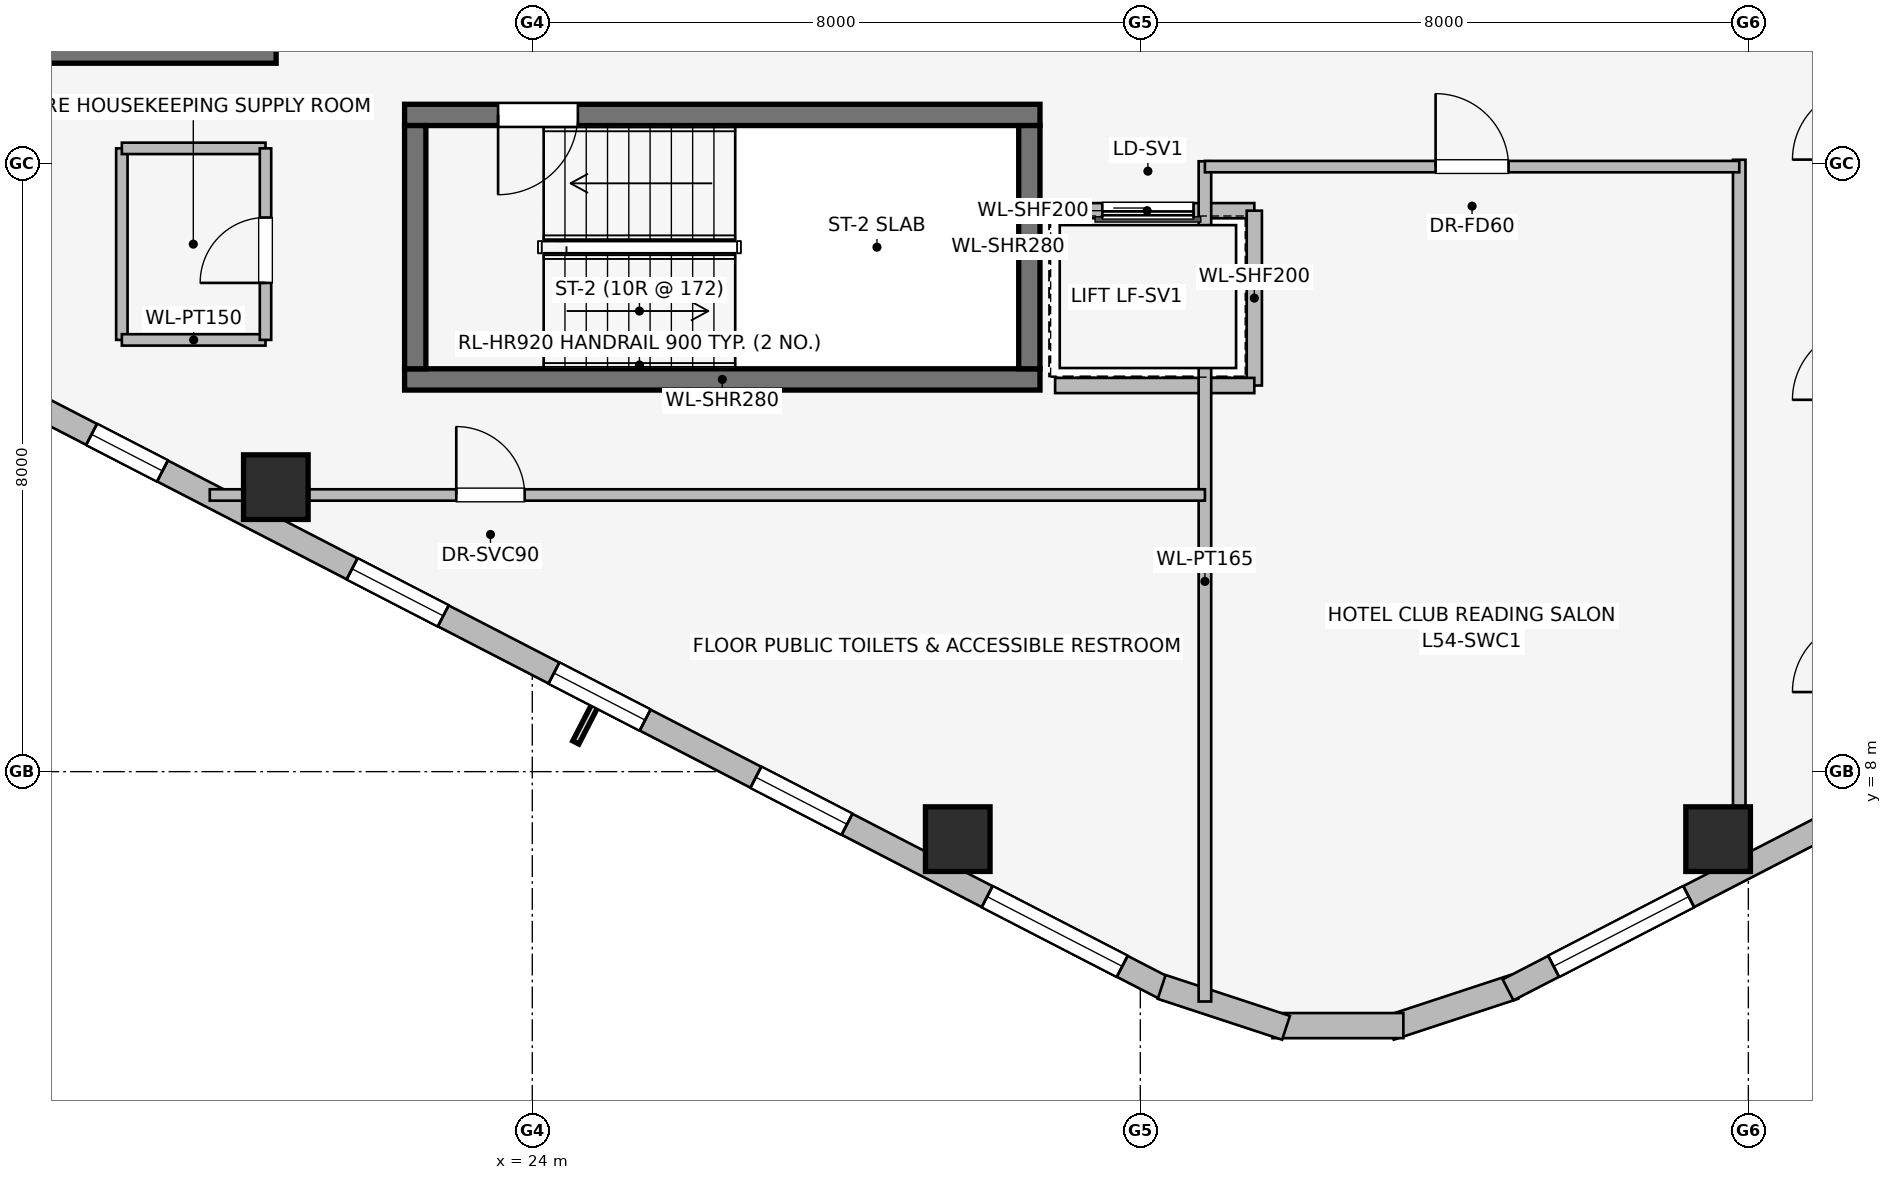
"""IFC4 building model, lengths in metres.
Left out: names, types, materials, properties, quantities, classifications, styles, units other than length and angle.
Written with IfcOpenShell. Run it as: python <this file> out.ifc"""

import sys

from ifc_helpers import new_model, si_unit, direction, frame, frame_2d, origin, origin_2d, place, context, subcontext, project, spatial, rectangle, extrude, element, fill, save


model = new_model("IFC4")
c1 = context("Model", 3, precision=1e-05, world=origin(), true_north=direction((0.0, 1.0)))
c2 = subcontext(c1, "Body", "Model", "MODEL_VIEW")
j1 = project(units=[si_unit("LENGTHUNIT", "METRE"), si_unit("PLANEANGLEUNIT", "RADIAN")], contexts=[c1])
p1 = place(None, origin())
s1 = spatial("IfcSite", under=j1, at=p1, CompositionType="ELEMENT")
p2 = place(p1, origin())
s2 = spatial("IfcBuilding", under=s1, at=p2, CompositionType="ELEMENT")
p3 = place(p2, frame((0.0, 0.0, 199.9)))
s3 = spatial("IfcBuildingStorey", under=s2, at=p3, CompositionType="ELEMENT", Elevation=199.9)
p4 = place(p3, frame((16.87, 17.46, 0.0), z_axis=(0.0, 0.0, 1.0), x_axis=(1.0, 0.0, 0.0)))
e1 = element("IfcWall", 1, at=p4, inside=s3, PredefinedType="SHEAR", context=c2, shape_type="SweptSolid", body=[
    extrude(rectangle(XDim=3.76, YDim=0.28, at=frame_2d((1.88, 0.0))), origin(), (0.0, 0.0, 1.0), 3.45),
])
p5 = place(p3, frame((22.32, 13.16, 0.0), z_axis=(0.0, 0.0, 1.0), x_axis=(1.0, 0.0, 0.0)))
e2 = element("IfcWall", 2, at=p5, inside=s3, PredefinedType="SHEAR", context=c2, shape_type="SweptSolid", body=[
    extrude(rectangle(XDim=8.36, YDim=0.28, at=frame_2d((4.18, 0.0))), origin(), (0.0, 0.0, 1.0), 3.45),
])
p6 = place(p3, frame((30.68, 16.64, 0.0), z_axis=(0.0, 0.0, 1.0), x_axis=(-1.0, 0.0, 0.0)))
e3 = element("IfcWall", 3, at=p6, inside=s3, PredefinedType="SHEAR", context=c2, shape_type="SweptSolid", body=[
    extrude(rectangle(XDim=8.36, YDim=0.28, at=frame_2d((4.18, 0.0))), origin(), (0.0, 0.0, 1.0), 3.45),
])
p7 = place(p6, frame((6.08, 0.0, 0.0)))
e4 = element("IfcOpeningElement", 4, at=p7, cuts=e3, PredefinedType="OPENING", context=c2, shape_type="SweptSolid", body=[
    extrude(rectangle(XDim=1.05, YDim=2.0, at=frame_2d((0.525, 1.0))), frame((0.0, 0.15, 0.0), z_axis=(0.0, -1.0, 0.0), x_axis=(1.0, 0.0, 0.0)), (0.0, 0.0, 1.0), 0.3),
])
for number, where, z_axis, x_axis in (
    (5, (22.46, 16.5, 0.0), (0.0, 0.0, 1.0), (0.0, -1.0, 0.0)),
    (6, (30.54, 13.3, 0.0), (0.0, 0.0, 1.0), (0.0, 1.0, 0.0)),
):
    element("IfcWall", number, at=place(p3, frame(where, z_axis=z_axis, x_axis=x_axis)), inside=s3, PredefinedType="SHEAR", context=c2, shape_type="SweptSolid", body=[
        extrude(rectangle(XDim=3.2, YDim=0.28, at=frame_2d((1.6, 0.0))), origin(), (0.0, 0.0, 1.0), 3.45),
    ])
for number, where, z_axis, x_axis in (
    (7, (20.626, 11.743, 0.0), (0.0, 0.0, 1.0), (1.0, 0.0, 0.0)),
    (8, (29.598, 7.112, 0.0), (0.0, 0.0, 1.0), (1.0, 0.0, 0.0)),
    (9, (39.602, 7.112, 0.0), (0.0, 0.0, 1.0), (1.0, 0.0, 0.0)),
):
    element("IfcColumn", number, at=place(p3, frame(where, z_axis=z_axis, x_axis=x_axis)), inside=s3, PredefinedType="COLUMN", context=c2, shape_type="SweptSolid", body=[
        extrude(rectangle(XDim=0.85, YDim=0.85, at=origin_2d()), origin(), (0.0, 0.0, 1.0), 3.45),
    ])
p8 = place(p3, frame((32.362, 5.129, 0.0), z_axis=(0.0, 0.0, 1.0), x_axis=(-0.888626188278, 0.458632202867, 0.0)))
e10 = element("IfcWall", 10, at=p8, inside=s3, PredefinedType="STANDARD", context=c2, shape_type="SweptSolid", body=[
    extrude(rectangle(XDim=16.828, YDim=0.31, at=frame_2d((8.414, 0.0))), origin(), (0.0, 0.0, 1.0), 3.19),
])
p9 = place(p8, frame((0.675, 0.0, 0.75)))
e11 = element("IfcOpeningElement", 11, at=p9, cuts=e10, PredefinedType="OPENING", context=c2, shape_type="SweptSolid", body=[
    extrude(rectangle(XDim=2.0, YDim=1.5, at=frame_2d((1.0, 0.75))), frame((0.0, 0.165, 0.0), z_axis=(0.0, -1.0, 0.0), x_axis=(1.0, 0.0, 0.0)), (0.0, 0.0, 1.0), 0.33),
])
p10 = place(p8, frame((4.75, 0.0, 0.75)))
e12 = element("IfcOpeningElement", 12, at=p10, cuts=e10, PredefinedType="OPENING", context=c2, shape_type="SweptSolid", body=[
    extrude(rectangle(XDim=1.35, YDim=1.45, at=frame_2d((0.675, 0.725))), frame((0.0, 0.165, 0.0), z_axis=(0.0, -1.0, 0.0), x_axis=(1.0, 0.0, 0.0)), (0.0, 0.0, 1.0), 0.33),
])
p11 = place(p8, frame((7.739, 0.0, 0.75)))
e13 = element("IfcOpeningElement", 13, at=p11, cuts=e10, PredefinedType="OPENING", context=c2, shape_type="SweptSolid", body=[
    extrude(rectangle(XDim=1.35, YDim=1.45, at=frame_2d((0.675, 0.725))), frame((0.0, 0.165, 0.0), z_axis=(0.0, -1.0, 0.0), x_axis=(1.0, 0.0, 0.0)), (0.0, 0.0, 1.0), 0.33),
])
p12 = place(p8, frame((10.728, 0.0, 0.75)))
e14 = element("IfcOpeningElement", 14, at=p12, cuts=e10, PredefinedType="OPENING", context=c2, shape_type="SweptSolid", body=[
    extrude(rectangle(XDim=1.35, YDim=1.45, at=frame_2d((0.675, 0.725))), frame((0.0, 0.165, 0.0), z_axis=(0.0, -1.0, 0.0), x_axis=(1.0, 0.0, 0.0)), (0.0, 0.0, 1.0), 0.33),
])
p13 = place(p8, frame((14.885, 0.0, 0.75)))
e15 = element("IfcOpeningElement", 15, at=p13, cuts=e10, PredefinedType="OPENING", context=c2, shape_type="SweptSolid", body=[
    extrude(rectangle(XDim=1.05, YDim=1.4, at=frame_2d((0.525, 0.7))), frame((0.0, 0.165, 0.0), z_axis=(0.0, -1.0, 0.0), x_axis=(1.0, 0.0, 0.0)), (0.0, 0.0, 1.0), 0.33),
])
p14 = place(p3, frame((36.919, 5.168, 0.0), z_axis=(0.0, 0.0, 1.0), x_axis=(-0.949937416267, -0.312440242569, 0.0)))
e16 = element("IfcWall", 16, at=p14, inside=s3, PredefinedType="STANDARD", context=c2, shape_type="SweptSolid", body=[
    extrude(rectangle(XDim=1.722, YDim=0.33, at=frame_2d((0.861, 0.0))), origin(), (0.0, 0.0, 1.0), 3.19),
])
p15 = place(p3, frame((35.461, 4.659, 0.0), z_axis=(0.0, 0.0, 1.0), x_axis=(-1.0, 0.0, 0.0)))
e17 = element("IfcWall", 17, at=p15, inside=s3, PredefinedType="STANDARD", context=c2, shape_type="SweptSolid", body=[
    extrude(rectangle(XDim=1.722, YDim=0.33, at=frame_2d((0.861, 0.0))), origin(), (0.0, 0.0, 1.0), 3.19),
])
p16 = place(p3, frame((33.917, 4.63, 0.0), z_axis=(0.0, 0.0, 1.0), x_axis=(-0.949937416267, 0.312440242569, 0.0)))
e18 = element("IfcWall", 18, at=p16, inside=s3, PredefinedType="STANDARD", context=c2, shape_type="SweptSolid", body=[
    extrude(rectangle(XDim=1.722, YDim=0.33, at=frame_2d((0.861, 0.0))), origin(), (0.0, 0.0, 1.0), 3.19),
])
p17 = place(p3, frame((51.792, 12.847, 0.0), z_axis=(0.0, 0.0, 1.0), x_axis=(-0.888626188278, -0.458632202867, 0.0)))
e19 = element("IfcWall", 19, at=p17, inside=s3, PredefinedType="STANDARD", context=c2, shape_type="SweptSolid", body=[
    extrude(rectangle(XDim=16.828, YDim=0.31, at=frame_2d((8.414, 0.0))), origin(), (0.0, 0.0, 1.0), 3.19),
])
p18 = place(p17, frame((0.729, 0.0, 0.75)))
e20 = element("IfcOpeningElement", 20, at=p18, cuts=e19, PredefinedType="OPENING", context=c2, shape_type="SweptSolid", body=[
    extrude(rectangle(XDim=1.05, YDim=1.4, at=frame_2d((0.525, 0.7))), frame((0.0, 0.165, 0.0), z_axis=(0.0, -1.0, 0.0), x_axis=(1.0, 0.0, 0.0)), (0.0, 0.0, 1.0), 0.33),
])
p19 = place(p17, frame((4.486, 0.0, 0.75)))
e21 = element("IfcOpeningElement", 21, at=p19, cuts=e19, PredefinedType="OPENING", context=c2, shape_type="SweptSolid", body=[
    extrude(rectangle(XDim=1.35, YDim=1.45, at=frame_2d((0.675, 0.725))), frame((0.0, 0.165, 0.0), z_axis=(0.0, -1.0, 0.0), x_axis=(1.0, 0.0, 0.0)), (0.0, 0.0, 1.0), 0.33),
])
p20 = place(p17, frame((6.946, 0.0, 0.75)))
e22 = element("IfcOpeningElement", 22, at=p20, cuts=e19, PredefinedType="OPENING", context=c2, shape_type="SweptSolid", body=[
    extrude(rectangle(XDim=1.35, YDim=1.45, at=frame_2d((0.675, 0.725))), frame((0.0, 0.165, 0.0), z_axis=(0.0, -1.0, 0.0), x_axis=(1.0, 0.0, 0.0)), (0.0, 0.0, 1.0), 0.33),
])
p21 = place(p17, frame((9.406, 0.0, 0.75)))
e23 = element("IfcOpeningElement", 23, at=p21, cuts=e19, PredefinedType="OPENING", context=c2, shape_type="SweptSolid", body=[
    extrude(rectangle(XDim=1.35, YDim=1.45, at=frame_2d((0.675, 0.725))), frame((0.0, 0.165, 0.0), z_axis=(0.0, -1.0, 0.0), x_axis=(1.0, 0.0, 0.0)), (0.0, 0.0, 1.0), 0.33),
])
p22 = place(p17, frame((14.153, 0.0, 0.75)))
e24 = element("IfcOpeningElement", 24, at=p22, cuts=e19, PredefinedType="OPENING", context=c2, shape_type="SweptSolid", body=[
    extrude(rectangle(XDim=2.0, YDim=1.5, at=frame_2d((1.0, 0.75))), frame((0.0, 0.165, 0.0), z_axis=(0.0, -1.0, 0.0), x_axis=(1.0, 0.0, 0.0)), (0.0, 0.0, 1.0), 0.33),
])
p23 = place(p3, frame((33.5, 15.38, 0.0), z_axis=(0.0, 0.0, 1.0), x_axis=(-1.0, 0.0, 0.0)))
e25 = element("IfcWall", 25, at=p23, inside=s3, PredefinedType="PARTITIONING", context=c2, shape_type="SweptSolid", body=[
    extrude(rectangle(XDim=2.82, YDim=0.2, at=frame_2d((1.41, 0.0))), origin(), (0.0, 0.0, 1.0), 3.19),
])
p24 = place(p23, frame((0.8, 0.0, 0.0)))
e26 = element("IfcOpeningElement", 26, at=p24, cuts=e25, PredefinedType="OPENING", context=c2, shape_type="SweptSolid", body=[
    extrude(rectangle(XDim=1.2, YDim=2.2, at=frame_2d((0.6, 1.1))), frame((0.0, 0.11, 0.0), z_axis=(0.0, -1.0, 0.0), x_axis=(1.0, 0.0, 0.0)), (0.0, 0.0, 1.0), 0.22),
])
p25 = place(p3, frame((33.5, 13.08, 0.0), z_axis=(0.0, 0.0, 1.0), x_axis=(0.0, 1.0, 0.0)))
e27 = element("IfcWall", 27, at=p25, inside=s3, PredefinedType="PARTITIONING", context=c2, shape_type="SweptSolid", body=[
    extrude(rectangle(XDim=2.3, YDim=0.2, at=frame_2d((1.15, 0.0))), origin(), (0.0, 0.0, 1.0), 3.19),
])
p26 = place(p3, frame((30.879, 13.08, 0.0), z_axis=(0.0, 0.0, 1.0), x_axis=(1.0, 0.0, 0.0)))
e28 = element("IfcWall", 28, at=p26, inside=s3, PredefinedType="PARTITIONING", context=c2, shape_type="SweptSolid", body=[
    extrude(rectangle(XDim=2.621, YDim=0.2, at=frame_2d((1.311, 0.0))), origin(), (0.0, 0.0, 1.0), 3.19),
])
p27 = place(p3, frame((18.6, 16.2, 0.0), z_axis=(0.0, 0.0, 1.0), x_axis=(0.0, -1.0, 0.0)))
e29 = element("IfcWall", 29, at=p27, inside=s3, PredefinedType="PARTITIONING", context=c2, shape_type="SweptSolid", body=[
    extrude(rectangle(XDim=2.52, YDim=0.15, at=frame_2d((1.26, 0.0))), origin(), (0.0, 0.0, 1.0), 3.19),
])
for number, where, z_axis, x_axis in (
    (30, (18.6, 13.68, 0.0), (0.0, 0.0, 1.0), (1.0, 0.0, 0.0)),
    (31, (18.6, 16.2, 0.0), (0.0, 0.0, 1.0), (1.0, 0.0, 0.0)),
):
    element("IfcWall", number, at=place(p3, frame(where, z_axis=z_axis, x_axis=x_axis)), inside=s3, PredefinedType="PARTITIONING", context=c2, shape_type="SweptSolid", body=[
        extrude(rectangle(XDim=1.89, YDim=0.15, at=frame_2d((0.945, 0.0))), origin(), (0.0, 0.0, 1.0), 3.19),
    ])
p28 = place(p3, frame((20.49, 13.68, 0.0), z_axis=(0.0, 0.0, 1.0), x_axis=(0.0, 1.0, 0.0)))
e32 = element("IfcWall", 32, at=p28, inside=s3, PredefinedType="PARTITIONING", context=c2, shape_type="SweptSolid", body=[
    extrude(rectangle(XDim=2.52, YDim=0.15, at=frame_2d((1.26, 0.0))), origin(), (0.0, 0.0, 1.0), 3.19),
])
p29 = place(p28, frame((0.75, 0.0, 0.0)))
e33 = element("IfcOpeningElement", 33, at=p29, cuts=e32, PredefinedType="OPENING", context=c2, shape_type="SweptSolid", body=[
    extrude(rectangle(XDim=0.86, YDim=2.0, at=frame_2d((0.43, 1.0))), frame((0.0, 0.085, 0.0), z_axis=(0.0, -1.0, 0.0), x_axis=(1.0, 0.0, 0.0)), (0.0, 0.0, 1.0), 0.17),
])
p30 = place(p3, frame((32.85, 4.976, 0.0), z_axis=(0.0, 0.0, 1.0), x_axis=(0.0, 1.0, 0.0)))
e34 = element("IfcWall", 34, at=p30, inside=s3, PredefinedType="PARTITIONING", context=c2, shape_type="SweptSolid", body=[
    extrude(rectangle(XDim=11.054, YDim=0.165, at=frame_2d((5.527, 0.0))), origin(), (0.0, 0.0, 1.0), 3.19),
])
p31 = place(p3, frame((19.757, 11.64, 0.0), z_axis=(0.0, 0.0, 1.0), x_axis=(1.0, 0.0, 0.0)))
e35 = element("IfcWall", 35, at=p31, inside=s3, PredefinedType="PARTITIONING", context=c2, shape_type="SweptSolid", body=[
    extrude(rectangle(XDim=13.093, YDim=0.15, at=frame_2d((6.546, 0.0))), origin(), (0.0, 0.0, 1.0), 3.19),
])
p32 = place(p31, frame((3.243, 0.0, 0.0)))
e36 = element("IfcOpeningElement", 36, at=p32, cuts=e35, PredefinedType="OPENING", context=c2, shape_type="SweptSolid", body=[
    extrude(rectangle(XDim=0.9, YDim=2.0, at=frame_2d((0.45, 1.0))), frame((0.0, 0.085, 0.0), z_axis=(0.0, -1.0, 0.0), x_axis=(1.0, 0.0, 0.0)), (0.0, 0.0, 1.0), 0.17),
])
p33 = place(p3, frame((39.88, 6.704, 0.0), z_axis=(0.0, 0.0, 1.0), x_axis=(0.0, 1.0, 0.0)))
e37 = element("IfcWall", 37, at=p33, inside=s3, PredefinedType="PARTITIONING", context=c2, shape_type="SweptSolid", body=[
    extrude(rectangle(XDim=9.346, YDim=0.165, at=frame_2d((4.673, 0.0))), origin(), (0.0, 0.0, 1.0), 2.497),
])
p34 = place(p3, frame((32.85, 15.96, 0.0), z_axis=(0.0, 0.0, 1.0), x_axis=(1.0, 0.0, 0.0)))
e38 = element("IfcWall", 38, at=p34, inside=s3, PredefinedType="PARTITIONING", context=c2, shape_type="SweptSolid", body=[
    extrude(rectangle(XDim=7.03, YDim=0.15, at=frame_2d((3.515, 0.0))), origin(), (0.0, 0.0, 1.0), 3.19),
])
p35 = place(p34, frame((3.035, 0.0, 0.0)))
e39 = element("IfcOpeningElement", 39, at=p35, cuts=e38, PredefinedType="OPENING", context=c2, shape_type="SweptSolid", body=[
    extrude(rectangle(XDim=0.96, YDim=2.0, at=frame_2d((0.48, 1.0))), frame((0.0, 0.085, 0.0), z_axis=(0.0, -1.0, 0.0), x_axis=(1.0, 0.0, 0.0)), (0.0, 0.0, 1.0), 0.17),
])
p36 = place(p9, origin())
e40 = element("IfcWindow", 40, at=p36, inside=s3, PartitioningType="SINGLE_PANEL", PredefinedType="WINDOW", context=c2, shape_type="SweptSolid", body=[
    extrude(rectangle(XDim=2.0, YDim=1.5, at=frame_2d((1.0, 0.75))), frame((0.0, 0.03, 0.0), z_axis=(0.0, -1.0, 0.0), x_axis=(1.0, 0.0, 0.0)), (0.0, 0.0, 1.0), 0.06),
])
fill(e11, e40)
p37 = place(p10, origin())
e41 = element("IfcWindow", 41, at=p37, inside=s3, PartitioningType="SINGLE_PANEL", PredefinedType="WINDOW", context=c2, shape_type="SweptSolid", body=[
    extrude(rectangle(XDim=1.35, YDim=1.45, at=frame_2d((0.675, 0.725))), frame((0.0, 0.03, 0.0), z_axis=(0.0, -1.0, 0.0), x_axis=(1.0, 0.0, 0.0)), (0.0, 0.0, 1.0), 0.06),
])
fill(e12, e41)
p38 = place(p11, origin())
e42 = element("IfcWindow", 42, at=p38, inside=s3, PartitioningType="SINGLE_PANEL", PredefinedType="WINDOW", context=c2, shape_type="SweptSolid", body=[
    extrude(rectangle(XDim=1.35, YDim=1.45, at=frame_2d((0.675, 0.725))), frame((0.0, 0.03, 0.0), z_axis=(0.0, -1.0, 0.0), x_axis=(1.0, 0.0, 0.0)), (0.0, 0.0, 1.0), 0.06),
])
fill(e13, e42)
p39 = place(p12, origin())
e43 = element("IfcWindow", 43, at=p39, inside=s3, PartitioningType="SINGLE_PANEL", PredefinedType="WINDOW", context=c2, shape_type="SweptSolid", body=[
    extrude(rectangle(XDim=1.35, YDim=1.45, at=frame_2d((0.675, 0.725))), frame((0.0, 0.03, 0.0), z_axis=(0.0, -1.0, 0.0), x_axis=(1.0, 0.0, 0.0)), (0.0, 0.0, 1.0), 0.06),
])
fill(e14, e43)
p40 = place(p13, origin())
e44 = element("IfcWindow", 44, at=p40, inside=s3, PartitioningType="SINGLE_PANEL", PredefinedType="WINDOW", context=c2, shape_type="SweptSolid", body=[
    extrude(rectangle(XDim=1.05, YDim=1.4, at=frame_2d((0.525, 0.7))), frame((0.0, 0.03, 0.0), z_axis=(0.0, -1.0, 0.0), x_axis=(1.0, 0.0, 0.0)), (0.0, 0.0, 1.0), 0.06),
])
fill(e15, e44)
p41 = place(p22, origin())
e45 = element("IfcWindow", 45, at=p41, inside=s3, PartitioningType="SINGLE_PANEL", PredefinedType="WINDOW", context=c2, shape_type="SweptSolid", body=[
    extrude(rectangle(XDim=2.0, YDim=1.5, at=frame_2d((1.0, 0.75))), frame((0.0, 0.03, 0.0), z_axis=(0.0, -1.0, 0.0), x_axis=(1.0, 0.0, 0.0)), (0.0, 0.0, 1.0), 0.06),
])
fill(e24, e45)
p42 = place(p7, origin())
e46 = element("IfcDoor", 46, at=p42, inside=s3, OperationType="SINGLE_SWING_RIGHT", PredefinedType="DOOR", context=c2, shape_type="SweptSolid", body=[
    extrude(rectangle(XDim=1.05, YDim=2.0, at=frame_2d((0.525, 1.0))), frame((0.0, 0.025, 0.0), z_axis=(0.0, -1.0, 0.0), x_axis=(1.0, 0.0, 0.0)), (0.0, 0.0, 1.0), 0.05),
])
fill(e4, e46)
p43 = place(p24, origin())
e47 = element("IfcDoor", 47, at=p43, inside=s3, OperationType="SLIDING_TO_RIGHT", PredefinedType="DOOR", context=c2, shape_type="SweptSolid", body=[
    extrude(rectangle(XDim=1.2, YDim=2.2, at=frame_2d((0.6, 1.1))), frame((0.0, 0.025, 0.0), z_axis=(0.0, -1.0, 0.0), x_axis=(1.0, 0.0, 0.0)), (0.0, 0.0, 1.0), 0.05),
])
fill(e26, e47)
p44 = place(p29, origin())
e48 = element("IfcDoor", 48, at=p44, inside=s3, OperationType="SINGLE_SWING_LEFT", PredefinedType="DOOR", context=c2, shape_type="SweptSolid", body=[
    extrude(rectangle(XDim=0.86, YDim=2.0, at=frame_2d((0.43, 1.0))), frame((0.0, 0.025, 0.0), z_axis=(0.0, -1.0, 0.0), x_axis=(1.0, 0.0, 0.0)), (0.0, 0.0, 1.0), 0.05),
])
fill(e33, e48)
p45 = place(p32, origin())
e49 = element("IfcDoor", 49, at=p45, inside=s3, OperationType="SINGLE_SWING_LEFT", PredefinedType="DOOR", context=c2, shape_type="SweptSolid", body=[
    extrude(rectangle(XDim=0.9, YDim=2.0, at=frame_2d((0.45, 1.0))), frame((0.0, 0.025, 0.0), z_axis=(0.0, -1.0, 0.0), x_axis=(1.0, 0.0, 0.0)), (0.0, 0.0, 1.0), 0.05),
])
fill(e36, e49)
p46 = place(p35, origin())
e50 = element("IfcDoor", 50, at=p46, inside=s3, OperationType="SINGLE_SWING_LEFT", PredefinedType="DOOR", context=c2, shape_type="SweptSolid", body=[
    extrude(rectangle(XDim=0.96, YDim=2.0, at=frame_2d((0.48, 1.0))), frame((0.0, 0.025, 0.0), z_axis=(0.0, -1.0, 0.0), x_axis=(1.0, 0.0, 0.0)), (0.0, 0.0, 1.0), 0.05),
])
fill(e39, e50)
save(model, sys.argv[1])
